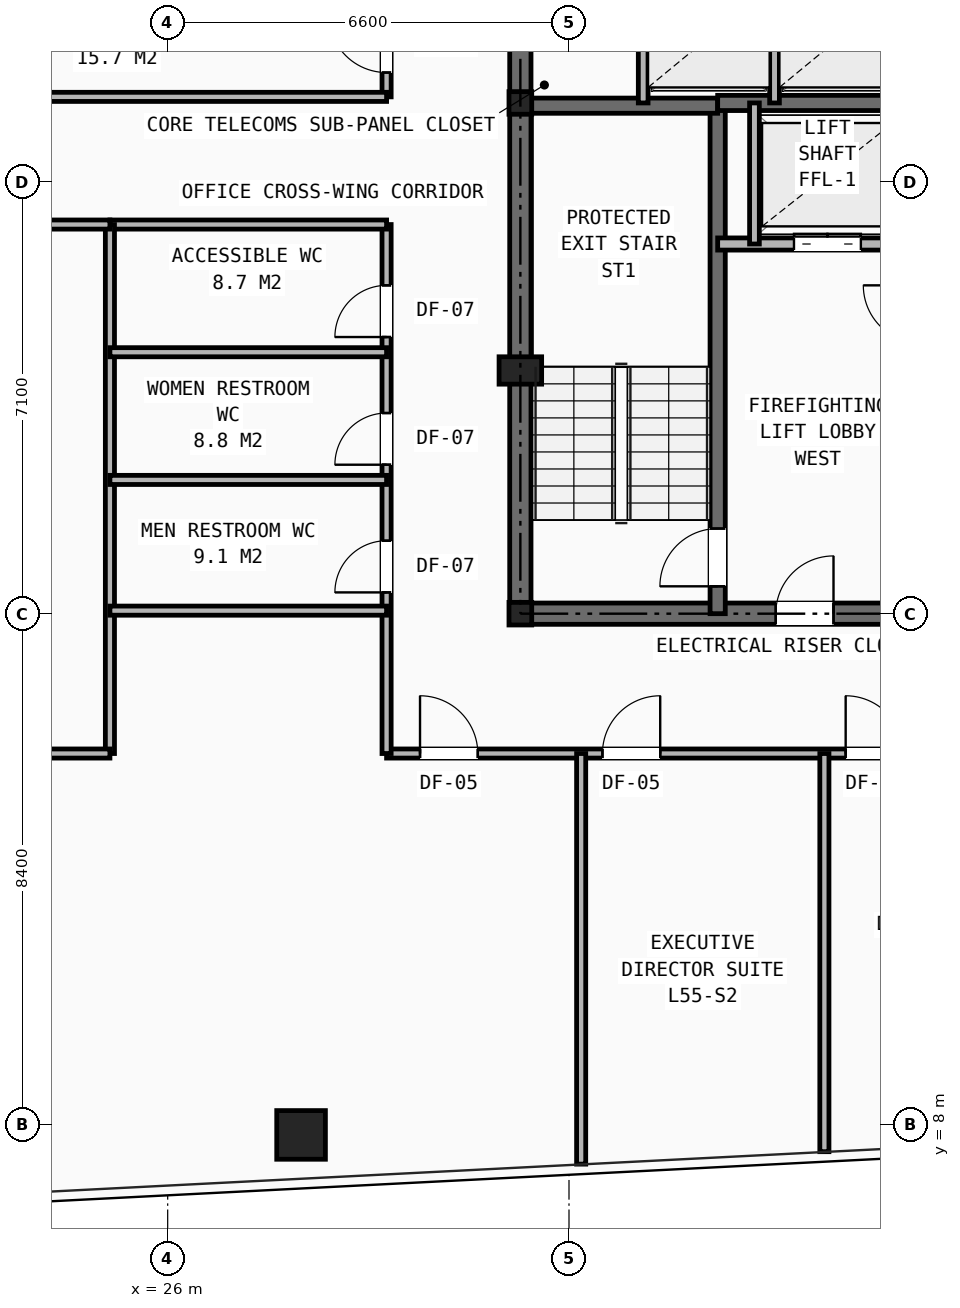
"""IFC4 building model, lengths in metres.
Left out: names, types, materials, properties, quantities, classifications, styles, units other than length and angle.
Written with IfcOpenShell. Run it as: python <this file> out.ifc"""

import sys

from ifc_helpers import new_model, si_unit, direction, frame, frame_2d, origin, origin_2d, place, context, subcontext, project, spatial, rectangle, hollow_rectangle, i_section, extrude, element, fill, save


model = new_model("IFC4")
c1 = context("Model", 3, precision=1e-05, world=origin(), true_north=direction((0.0, 1.0)))
c2 = subcontext(c1, "Body", "Model", "MODEL_VIEW")
j1 = project(units=[si_unit("LENGTHUNIT", "METRE"), si_unit("PLANEANGLEUNIT", "RADIAN")], contexts=[c1])
p1 = place(None, origin())
s1 = spatial("IfcSite", under=j1, at=p1, CompositionType="ELEMENT")
p2 = place(p1, origin())
s2 = spatial("IfcBuilding", under=s1, at=p2, CompositionType="ELEMENT")
p3 = place(p2, frame((0.0, 0.0, 193.05)))
s3 = spatial("IfcBuildingStorey", under=s2, at=p3, CompositionType="ELEMENT", Elevation=193.05)
for number, where, z_axis, x_axis in (
    (1, (31.8, 16.4, 0.0), (0.0, 0.0, 1.0), (1.0, 0.0, 0.0)),
    (2, (31.8, 24.8, 0.0), (0.0, 0.0, 1.0), (1.0, 0.0, 0.0)),
):
    element("IfcColumn", number, at=place(p3, frame(where, z_axis=z_axis, x_axis=x_axis)), inside=s3, PredefinedType="COLUMN", context=c2, shape_type="SweptSolid", body=[
        extrude(i_section(OverallWidth=0.374, OverallDepth=0.372, WebThickness=0.016, FlangeThickness=0.026, at=origin_2d()), origin(), (0.0, 0.0, 1.0), 3.45),
    ])
p4 = place(p3, frame((31.8, 20.4, 0.0), z_axis=(0.0, 0.0, 1.0), x_axis=(1.0, 0.0, 0.0)))
e3 = element("IfcColumn", 3, at=p4, inside=s3, PredefinedType="PILASTER", context=c2, shape_type="SweptSolid", body=[
    extrude(rectangle(XDim=0.7, YDim=0.45, at=origin_2d()), origin(), (0.0, 0.0, 1.0), 3.45),
])
p5 = place(p3, frame((28.194, 7.827, 0.0), z_axis=(0.0, 0.0, 1.0), x_axis=(1.0, 0.0, 0.0)))
e4 = element("IfcColumn", 4, at=p5, inside=s3, PredefinedType="COLUMN", context=c2, shape_type="SweptSolid", body=[
    extrude(hollow_rectangle(XDim=0.8, YDim=0.8, WallThickness=0.055, at=origin_2d()), origin(), (0.0, 0.0, 1.0), 3.45),
])
p6 = place(p3, frame((31.8, 16.4, 0.0), z_axis=(0.0, 0.0, 1.0), x_axis=(1.0, 0.0, 0.0)))
e5 = element("IfcWall", 5, at=p6, inside=s3, PredefinedType="SHEAR", context=c2, shape_type="SweptSolid", body=[
    extrude(rectangle(XDim=16.4, YDim=0.35, at=frame_2d((8.2, 0.0))), origin(), (0.0, 0.0, 1.0), 3.03),
])
p7 = place(p6, frame((7.75, 0.0, 0.0)))
e6 = element("IfcOpeningElement", 6, at=p7, cuts=e5, PredefinedType="OPENING", context=c2, shape_type="SweptSolid", body=[
    extrude(rectangle(XDim=0.9, YDim=2.1, at=frame_2d((0.45, 1.05))), frame((0.0, 0.185, 0.0), z_axis=(0.0, -1.0, 0.0), x_axis=(1.0, 0.0, 0.0)), (0.0, 0.0, 1.0), 0.37),
])
p8 = place(p6, frame((4.2, 0.0, 0.0)))
e7 = element("IfcOpeningElement", 7, at=p8, cuts=e5, PredefinedType="OPENING", context=c2, shape_type="SweptSolid", body=[
    extrude(rectangle(XDim=0.95, YDim=2.1, at=frame_2d((0.475, 1.05))), frame((0.0, 0.185, 0.0), z_axis=(0.0, -1.0, 0.0), x_axis=(1.0, 0.0, 0.0)), (0.0, 0.0, 1.0), 0.37),
])
p9 = place(p6, frame((10.6, 0.0, 0.0)))
e8 = element("IfcOpeningElement", 8, at=p9, cuts=e5, PredefinedType="OPENING", context=c2, shape_type="SweptSolid", body=[
    extrude(rectangle(XDim=0.95, YDim=2.1, at=frame_2d((0.475, 1.05))), frame((0.0, 0.185, 0.0), z_axis=(0.0, -1.0, 0.0), x_axis=(1.0, 0.0, 0.0)), (0.0, 0.0, 1.0), 0.37),
])
p10 = place(p3, frame((31.8, 16.4, 0.0), z_axis=(0.0, 0.0, 1.0), x_axis=(0.0, 1.0, 0.0)))
e9 = element("IfcWall", 9, at=p10, inside=s3, PredefinedType="SHEAR", context=c2, shape_type="SweptSolid", body=[
    extrude(rectangle(XDim=14.8, YDim=0.35, at=frame_2d((7.4, 0.0))), origin(), (0.0, 0.0, 1.0), 3.03),
])
p11 = place(p10, frame((11.0, 0.0, 0.0)))
e10 = element("IfcOpeningElement", 10, at=p11, cuts=e9, PredefinedType="OPENING", context=c2, shape_type="SweptSolid", body=[
    extrude(rectangle(XDim=1.1, YDim=2.15, at=frame_2d((0.55, 1.075))), frame((0.0, 0.185, 0.0), z_axis=(0.0, -1.0, 0.0), x_axis=(1.0, 0.0, 0.0)), (0.0, 0.0, 1.0), 0.37),
])
p12 = place(p3, frame((35.045, 16.4, 0.0), z_axis=(0.0, 0.0, 1.0), x_axis=(0.0, 1.0, 0.0)))
e11 = element("IfcWall", 11, at=p12, inside=s3, PredefinedType="SHEAR", context=c2, shape_type="SweptSolid", body=[
    extrude(rectangle(XDim=8.4, YDim=0.25, at=frame_2d((4.2, 0.0))), origin(), (0.0, 0.0, 1.0), 3.03),
])
p13 = place(p12, frame((0.45, 0.0, 0.0)))
e12 = element("IfcOpeningElement", 12, at=p13, cuts=e11, PredefinedType="OPENING", context=c2, shape_type="SweptSolid", body=[
    extrude(rectangle(XDim=0.95, YDim=2.1, at=frame_2d((0.475, 1.05))), frame((0.0, 0.135, 0.0), z_axis=(0.0, -1.0, 0.0), x_axis=(1.0, 0.0, 0.0)), (0.0, 0.0, 1.0), 0.27),
])
p14 = place(p3, frame((31.8, 24.755, 0.0), z_axis=(0.0, 0.0, 1.0), x_axis=(1.0, 0.0, 0.0)))
e13 = element("IfcWall", 13, at=p14, inside=s3, PredefinedType="SHEAR", context=c2, shape_type="SweptSolid", body=[
    extrude(rectangle(XDim=3.245, YDim=0.25, at=frame_2d((1.623, 0.0))), origin(), (0.0, 0.0, 1.0), 3.03),
])
p15 = place(p3, frame((35.045, 24.8, 0.0), z_axis=(0.0, 0.0, 1.0), x_axis=(1.0, 0.0, 0.0)))
e14 = element("IfcWall", 14, at=p15, inside=s3, PredefinedType="SHEAR", context=c2, shape_type="SweptSolid", body=[
    extrude(rectangle(XDim=9.91, YDim=0.25, at=frame_2d((4.955, 0.0))), origin(), (0.0, 0.0, 1.0), 3.03),
])
p16 = place(p3, frame((35.045, 22.48, 0.0), z_axis=(0.0, 0.0, 1.0), x_axis=(1.0, 0.0, 0.0)))
e15 = element("IfcWall", 15, at=p16, inside=s3, PredefinedType="SOLIDWALL", context=c2, shape_type="SweptSolid", body=[
    extrude(rectangle(XDim=9.91, YDim=0.2, at=frame_2d((4.955, 0.0))), origin(), (0.0, 0.0, 1.0), 3.03),
])
p17 = place(p16, frame((1.255, 0.0, 0.0)))
e16 = element("IfcOpeningElement", 16, at=p17, cuts=e15, PredefinedType="OPENING", context=c2, shape_type="SweptSolid", body=[
    extrude(rectangle(XDim=1.1, YDim=2.15, at=frame_2d((0.55, 1.075))), frame((0.0, 0.11, 0.0), z_axis=(0.0, -1.0, 0.0), x_axis=(1.0, 0.0, 0.0)), (0.0, 0.0, 1.0), 0.22),
])
p18 = place(p16, frame((7.555, 0.0, 0.0)))
e17 = element("IfcOpeningElement", 17, at=p18, cuts=e15, PredefinedType="OPENING", context=c2, shape_type="SweptSolid", body=[
    extrude(rectangle(XDim=1.1, YDim=2.15, at=frame_2d((0.55, 1.075))), frame((0.0, 0.11, 0.0), z_axis=(0.0, -1.0, 0.0), x_axis=(1.0, 0.0, 0.0)), (0.0, 0.0, 1.0), 0.22),
])
p19 = place(p16, frame((4.405, 0.0, 0.0)))
e18 = element("IfcOpeningElement", 18, at=p19, cuts=e15, PredefinedType="OPENING", context=c2, shape_type="SweptSolid", body=[
    extrude(rectangle(XDim=1.1, YDim=2.15, at=frame_2d((0.55, 1.075))), frame((0.0, 0.11, 0.0), z_axis=(0.0, -1.0, 0.0), x_axis=(1.0, 0.0, 0.0)), (0.0, 0.0, 1.0), 0.22),
])
p20 = place(p3, frame((35.65, 22.48, 0.0), z_axis=(0.0, 0.0, 1.0), x_axis=(0.0, 1.0, 0.0)))
e19 = element("IfcWall", 19, at=p20, inside=s3, PredefinedType="SOLIDWALL", context=c2, shape_type="SweptSolid", body=[
    extrude(rectangle(XDim=2.32, YDim=0.16, at=frame_2d((1.16, 0.0))), origin(), (0.0, 0.0, 1.0), 3.03),
])
for number, where, z_axis, x_axis in (
    (20, (33.82, 24.8, 0.0), (0.0, 0.0, 1.0), (0.0, 1.0, 0.0)),
    (21, (35.98, 24.8, 0.0), (0.0, 0.0, 1.0), (0.0, 1.0, 0.0)),
):
    element("IfcWall", number, at=place(p3, frame(where, z_axis=z_axis, x_axis=x_axis)), inside=s3, PredefinedType="SOLIDWALL", context=c2, shape_type="SweptSolid", body=[
        extrude(rectangle(XDim=2.08, YDim=0.16, at=frame_2d((1.04, 0.0))), origin(), (0.0, 0.0, 1.0), 3.03),
    ])
p21 = place(p3, frame((29.6, 14.1, 0.0), z_axis=(0.0, 0.0, 1.0), x_axis=(1.0, 0.0, 0.0)))
e22 = element("IfcWall", 22, at=p21, inside=s3, PredefinedType="PARTITIONING", context=c2, shape_type="SweptSolid", body=[
    extrude(rectangle(XDim=18.6, YDim=0.15, at=frame_2d((9.3, 0.0))), origin(), (0.0, 0.0, 1.0), 2.161),
])
p22 = place(p21, frame((0.55, 0.0, 0.0)))
e23 = element("IfcOpeningElement", 23, at=p22, cuts=e22, PredefinedType="OPENING", context=c2, shape_type="SweptSolid", body=[
    extrude(rectangle(XDim=0.95, YDim=2.1, at=frame_2d((0.475, 1.05))), frame((0.0, 0.085, 0.0), z_axis=(0.0, -1.0, 0.0), x_axis=(1.0, 0.0, 0.0)), (0.0, 0.0, 1.0), 0.17),
])
p23 = place(p21, frame((3.55, 0.0, 0.0)))
e24 = element("IfcOpeningElement", 24, at=p23, cuts=e22, PredefinedType="OPENING", context=c2, shape_type="SweptSolid", body=[
    extrude(rectangle(XDim=0.95, YDim=2.1, at=frame_2d((0.475, 1.05))), frame((0.0, 0.085, 0.0), z_axis=(0.0, -1.0, 0.0), x_axis=(1.0, 0.0, 0.0)), (0.0, 0.0, 1.0), 0.17),
])
p24 = place(p21, frame((7.55, 0.0, 0.0)))
e25 = element("IfcOpeningElement", 25, at=p24, cuts=e22, PredefinedType="OPENING", context=c2, shape_type="SweptSolid", body=[
    extrude(rectangle(XDim=0.95, YDim=2.1, at=frame_2d((0.475, 1.05))), frame((0.0, 0.085, 0.0), z_axis=(0.0, -1.0, 0.0), x_axis=(1.0, 0.0, 0.0)), (0.0, 0.0, 1.0), 0.17),
])
p25 = place(p21, frame((11.95, 0.0, 0.0)))
e26 = element("IfcOpeningElement", 26, at=p25, cuts=e22, PredefinedType="OPENING", context=c2, shape_type="SweptSolid", body=[
    extrude(rectangle(XDim=0.95, YDim=2.1, at=frame_2d((0.475, 1.05))), frame((0.0, 0.085, 0.0), z_axis=(0.0, -1.0, 0.0), x_axis=(1.0, 0.0, 0.0)), (0.0, 0.0, 1.0), 0.17),
])
p26 = place(p21, frame((16.15, 0.0, 0.0)))
e27 = element("IfcOpeningElement", 27, at=p26, cuts=e22, PredefinedType="OPENING", context=c2, shape_type="SweptSolid", body=[
    extrude(rectangle(XDim=0.95, YDim=2.1, at=frame_2d((0.475, 1.05))), frame((0.0, 0.085, 0.0), z_axis=(0.0, -1.0, 0.0), x_axis=(1.0, 0.0, 0.0)), (0.0, 0.0, 1.0), 0.17),
])
p27 = place(p3, frame((29.6, 14.1, 0.0), z_axis=(0.0, 0.0, 1.0), x_axis=(0.0, 1.0, 0.0)))
e28 = element("IfcWall", 28, at=p27, inside=s3, PredefinedType="PARTITIONING", context=c2, shape_type="SweptSolid", body=[
    extrude(rectangle(XDim=8.7, YDim=0.15, at=frame_2d((4.35, 0.0))), origin(), (0.0, 0.0, 1.0), 3.03),
])
p28 = place(p27, frame((2.65, 0.0, 0.0)))
e29 = element("IfcOpeningElement", 29, at=p28, cuts=e28, PredefinedType="OPENING", context=c2, shape_type="SweptSolid", body=[
    extrude(rectangle(XDim=0.85, YDim=2.05, at=frame_2d((0.425, 1.025))), frame((0.0, 0.085, 0.0), z_axis=(0.0, -1.0, 0.0), x_axis=(1.0, 0.0, 0.0)), (0.0, 0.0, 1.0), 0.17),
])
p29 = place(p27, frame((4.75, 0.0, 0.0)))
e30 = element("IfcOpeningElement", 30, at=p29, cuts=e28, PredefinedType="OPENING", context=c2, shape_type="SweptSolid", body=[
    extrude(rectangle(XDim=0.85, YDim=2.05, at=frame_2d((0.425, 1.025))), frame((0.0, 0.085, 0.0), z_axis=(0.0, -1.0, 0.0), x_axis=(1.0, 0.0, 0.0)), (0.0, 0.0, 1.0), 0.17),
])
p30 = place(p27, frame((6.85, 0.0, 0.0)))
e31 = element("IfcOpeningElement", 31, at=p30, cuts=e28, PredefinedType="OPENING", context=c2, shape_type="SweptSolid", body=[
    extrude(rectangle(XDim=0.85, YDim=2.05, at=frame_2d((0.425, 1.025))), frame((0.0, 0.085, 0.0), z_axis=(0.0, -1.0, 0.0), x_axis=(1.0, 0.0, 0.0)), (0.0, 0.0, 1.0), 0.17),
])
p31 = place(p3, frame((29.6, 24.9, 0.0), z_axis=(0.0, 0.0, 1.0), x_axis=(0.0, 1.0, 0.0)))
e32 = element("IfcWall", 32, at=p31, inside=s3, PredefinedType="PARTITIONING", context=c2, shape_type="SweptSolid", body=[
    extrude(rectangle(XDim=13.9, YDim=0.15, at=frame_2d((6.95, 0.0))), origin(), (0.0, 0.0, 1.0), 2.241),
])
p32 = place(p31, frame((0.4, 0.0, 0.0)))
e33 = element("IfcOpeningElement", 33, at=p32, cuts=e32, PredefinedType="OPENING", context=c2, shape_type="SweptSolid", body=[
    extrude(rectangle(XDim=0.95, YDim=2.1, at=frame_2d((0.475, 1.05))), frame((0.0, 0.085, 0.0), z_axis=(0.0, -1.0, 0.0), x_axis=(1.0, 0.0, 0.0)), (0.0, 0.0, 1.0), 0.17),
])
p33 = place(p31, frame((2.5, 0.0, 0.0)))
e34 = element("IfcOpeningElement", 34, at=p33, cuts=e32, PredefinedType="OPENING", context=c2, shape_type="SweptSolid", body=[
    extrude(rectangle(XDim=0.95, YDim=2.1, at=frame_2d((0.475, 1.05))), frame((0.0, 0.085, 0.0), z_axis=(0.0, -1.0, 0.0), x_axis=(1.0, 0.0, 0.0)), (0.0, 0.0, 1.0), 0.17),
])
p34 = place(p31, frame((5.7, 0.0, 0.0)))
e35 = element("IfcOpeningElement", 35, at=p34, cuts=e32, PredefinedType="OPENING", context=c2, shape_type="SweptSolid", body=[
    extrude(rectangle(XDim=0.95, YDim=2.1, at=frame_2d((0.475, 1.05))), frame((0.0, 0.085, 0.0), z_axis=(0.0, -1.0, 0.0), x_axis=(1.0, 0.0, 0.0)), (0.0, 0.0, 1.0), 0.17),
])
p35 = place(p31, frame((8.9, 0.0, 0.0)))
e36 = element("IfcOpeningElement", 36, at=p35, cuts=e32, PredefinedType="OPENING", context=c2, shape_type="SweptSolid", body=[
    extrude(rectangle(XDim=0.95, YDim=2.1, at=frame_2d((0.475, 1.05))), frame((0.0, 0.085, 0.0), z_axis=(0.0, -1.0, 0.0), x_axis=(1.0, 0.0, 0.0)), (0.0, 0.0, 1.0), 0.17),
])
p36 = place(p3, frame((25.05, 22.8, 0.0), z_axis=(0.0, 0.0, 1.0), x_axis=(1.0, 0.0, 0.0)))
e37 = element("IfcWall", 37, at=p36, inside=s3, PredefinedType="PARTITIONING", context=c2, shape_type="SweptSolid", body=[
    extrude(rectangle(XDim=4.55, YDim=0.15, at=frame_2d((2.275, 0.0))), origin(), (0.0, 0.0, 1.0), 2.613),
])
p37 = place(p3, frame((20.839, 24.9, 0.0), z_axis=(0.0, 0.0, 1.0), x_axis=(1.0, 0.0, 0.0)))
e38 = element("IfcWall", 38, at=p37, inside=s3, PredefinedType="PARTITIONING", context=c2, shape_type="SweptSolid", body=[
    extrude(rectangle(XDim=8.761, YDim=0.15, at=frame_2d((4.38, 0.0))), origin(), (0.0, 0.0, 1.0), 2.409),
])
p38 = place(p3, frame((25.05, 14.1, 0.0), z_axis=(0.0, 0.0, 1.0), x_axis=(0.0, 1.0, 0.0)))
e39 = element("IfcWall", 39, at=p38, inside=s3, PredefinedType="PARTITIONING", context=c2, shape_type="SweptSolid", body=[
    extrude(rectangle(XDim=8.7, YDim=0.15, at=frame_2d((4.35, 0.0))), origin(), (0.0, 0.0, 1.0), 2.613),
])
for number, where, z_axis, x_axis in (
    (40, (25.05, 16.45, 0.0), (0.0, 0.0, 1.0), (1.0, 0.0, 0.0)),
    (41, (25.05, 18.6, 0.0), (0.0, 0.0, 1.0), (1.0, 0.0, 0.0)),
    (42, (25.05, 20.7, 0.0), (0.0, 0.0, 1.0), (1.0, 0.0, 0.0)),
):
    element("IfcWall", number, at=place(p3, frame(where, z_axis=z_axis, x_axis=x_axis)), inside=s3, PredefinedType="PARTITIONING", context=c2, shape_type="SweptSolid", body=[
        extrude(rectangle(XDim=4.55, YDim=0.15, at=frame_2d((2.275, 0.0))), origin(), (0.0, 0.0, 1.0), 3.03),
    ])
p39 = place(p3, frame((32.8, 7.347, 0.0), z_axis=(0.0, 0.0, 1.0), x_axis=(0.0, 1.0, 0.0)))
e43 = element("IfcWall", 43, at=p39, inside=s3, PredefinedType="PARTITIONING", context=c2, shape_type="SweptSolid", body=[
    extrude(rectangle(XDim=6.753, YDim=0.15, at=frame_2d((3.376, 0.0))), origin(), (0.0, 0.0, 1.0), 2.409),
])
p40 = place(p3, frame((36.8, 7.552, 0.0), z_axis=(0.0, 0.0, 1.0), x_axis=(0.0, 1.0, 0.0)))
e44 = element("IfcWall", 44, at=p40, inside=s3, PredefinedType="PARTITIONING", context=c2, shape_type="SweptSolid", body=[
    extrude(rectangle(XDim=6.549, YDim=0.15, at=frame_2d((3.274, 0.0))), origin(), (0.0, 0.0, 1.0), 2.161),
])
p41 = place(p3, frame((13.844, 14.1, 0.0), z_axis=(0.0, 0.0, 1.0), x_axis=(1.0, 0.0, 0.0)))
e45 = element("IfcWall", 45, at=p41, inside=s3, PredefinedType="PARTITIONING", context=c2, shape_type="SweptSolid", body=[
    extrude(rectangle(XDim=11.206, YDim=0.15, at=frame_2d((5.603, 0.0))), origin(), (0.0, 0.0, 1.0), 2.241),
])
p42 = place(p3, frame((20.5, 22.8, 0.0), z_axis=(0.0, 0.0, 1.0), x_axis=(1.0, 0.0, 0.0)))
e46 = element("IfcWall", 46, at=p42, inside=s3, PredefinedType="PARTITIONING", context=c2, shape_type="SweptSolid", body=[
    extrude(rectangle(XDim=4.55, YDim=0.15, at=frame_2d((2.275, 0.0))), origin(), (0.0, 0.0, 1.0), 2.409),
])
p43 = place(p42, frame((1.4, 0.0, 0.0)))
e47 = element("IfcOpeningElement", 47, at=p43, cuts=e46, PredefinedType="OPENING", context=c2, shape_type="SweptSolid", body=[
    extrude(rectangle(XDim=0.95, YDim=2.1, at=frame_2d((0.475, 1.05))), frame((0.0, 0.085, 0.0), z_axis=(0.0, -1.0, 0.0), x_axis=(1.0, 0.0, 0.0)), (0.0, 0.0, 1.0), 0.17),
])
p44 = place(p13, origin())
e48 = element("IfcDoor", 48, at=p44, inside=s3, OperationType="SINGLE_SWING_LEFT", PredefinedType="DOOR", context=c2, shape_type="SweptSolid", body=[
    extrude(rectangle(XDim=0.95, YDim=2.1, at=frame_2d((0.475, 1.05))), frame((0.0, 0.025, 0.0), z_axis=(0.0, -1.0, 0.0), x_axis=(1.0, 0.0, 0.0)), (0.0, 0.0, 1.0), 0.05),
])
fill(e12, e48)
p45 = place(p8, origin())
e49 = element("IfcDoor", 49, at=p45, inside=s3, OperationType="SINGLE_SWING_RIGHT", PredefinedType="DOOR", context=c2, shape_type="SweptSolid", body=[
    extrude(rectangle(XDim=0.95, YDim=2.1, at=frame_2d((0.475, 1.05))), frame((0.0, 0.025, 0.0), z_axis=(0.0, -1.0, 0.0), x_axis=(1.0, 0.0, 0.0)), (0.0, 0.0, 1.0), 0.05),
])
fill(e7, e49)
p46 = place(p17, origin())
e50 = element("IfcDoor", 50, at=p46, inside=s3, OperationType="DOUBLE_DOOR_SLIDING", PredefinedType="DOOR", context=c2, shape_type="SweptSolid", body=[
    extrude(rectangle(XDim=1.1, YDim=2.15, at=frame_2d((0.55, 1.075))), frame((0.0, 0.025, 0.0), z_axis=(0.0, -1.0, 0.0), x_axis=(1.0, 0.0, 0.0)), (0.0, 0.0, 1.0), 0.05),
])
fill(e16, e50)
p47 = place(p28, origin())
e51 = element("IfcDoor", 51, at=p47, inside=s3, OperationType="SINGLE_SWING_LEFT", PredefinedType="DOOR", context=c2, shape_type="SweptSolid", body=[
    extrude(rectangle(XDim=0.85, YDim=2.05, at=frame_2d((0.425, 1.025))), frame((0.0, 0.025, 0.0), z_axis=(0.0, -1.0, 0.0), x_axis=(1.0, 0.0, 0.0)), (0.0, 0.0, 1.0), 0.05),
])
fill(e29, e51)
p48 = place(p29, origin())
e52 = element("IfcDoor", 52, at=p48, inside=s3, OperationType="SINGLE_SWING_LEFT", PredefinedType="DOOR", context=c2, shape_type="SweptSolid", body=[
    extrude(rectangle(XDim=0.85, YDim=2.05, at=frame_2d((0.425, 1.025))), frame((0.0, 0.025, 0.0), z_axis=(0.0, -1.0, 0.0), x_axis=(1.0, 0.0, 0.0)), (0.0, 0.0, 1.0), 0.05),
])
fill(e30, e52)
p49 = place(p30, origin())
e53 = element("IfcDoor", 53, at=p49, inside=s3, OperationType="SINGLE_SWING_LEFT", PredefinedType="DOOR", context=c2, shape_type="SweptSolid", body=[
    extrude(rectangle(XDim=0.85, YDim=2.05, at=frame_2d((0.425, 1.025))), frame((0.0, 0.025, 0.0), z_axis=(0.0, -1.0, 0.0), x_axis=(1.0, 0.0, 0.0)), (0.0, 0.0, 1.0), 0.05),
])
fill(e31, e53)
p50 = place(p22, origin())
e54 = element("IfcDoor", 54, at=p50, inside=s3, OperationType="SINGLE_SWING_LEFT", PredefinedType="DOOR", context=c2, shape_type="SweptSolid", body=[
    extrude(rectangle(XDim=0.95, YDim=2.1, at=frame_2d((0.475, 1.05))), frame((0.0, 0.025, 0.0), z_axis=(0.0, -1.0, 0.0), x_axis=(1.0, 0.0, 0.0)), (0.0, 0.0, 1.0), 0.05),
])
fill(e23, e54)
p51 = place(p23, origin())
e55 = element("IfcDoor", 55, at=p51, inside=s3, OperationType="SINGLE_SWING_RIGHT", PredefinedType="DOOR", context=c2, shape_type="SweptSolid", body=[
    extrude(rectangle(XDim=0.95, YDim=2.1, at=frame_2d((0.475, 1.05))), frame((0.0, 0.025, 0.0), z_axis=(0.0, -1.0, 0.0), x_axis=(1.0, 0.0, 0.0)), (0.0, 0.0, 1.0), 0.05),
])
fill(e24, e55)
p52 = place(p24, origin())
e56 = element("IfcDoor", 56, at=p52, inside=s3, OperationType="SINGLE_SWING_LEFT", PredefinedType="DOOR", context=c2, shape_type="SweptSolid", body=[
    extrude(rectangle(XDim=0.95, YDim=2.1, at=frame_2d((0.475, 1.05))), frame((0.0, 0.025, 0.0), z_axis=(0.0, -1.0, 0.0), x_axis=(1.0, 0.0, 0.0)), (0.0, 0.0, 1.0), 0.05),
])
fill(e25, e56)
p53 = place(p32, origin())
e57 = element("IfcDoor", 57, at=p53, inside=s3, OperationType="SINGLE_SWING_RIGHT", PredefinedType="DOOR", context=c2, shape_type="SweptSolid", body=[
    extrude(rectangle(XDim=0.95, YDim=2.1, at=frame_2d((0.475, 1.05))), frame((0.0, 0.025, 0.0), z_axis=(0.0, -1.0, 0.0), x_axis=(1.0, 0.0, 0.0)), (0.0, 0.0, 1.0), 0.05),
])
fill(e33, e57)
save(model, sys.argv[1])
